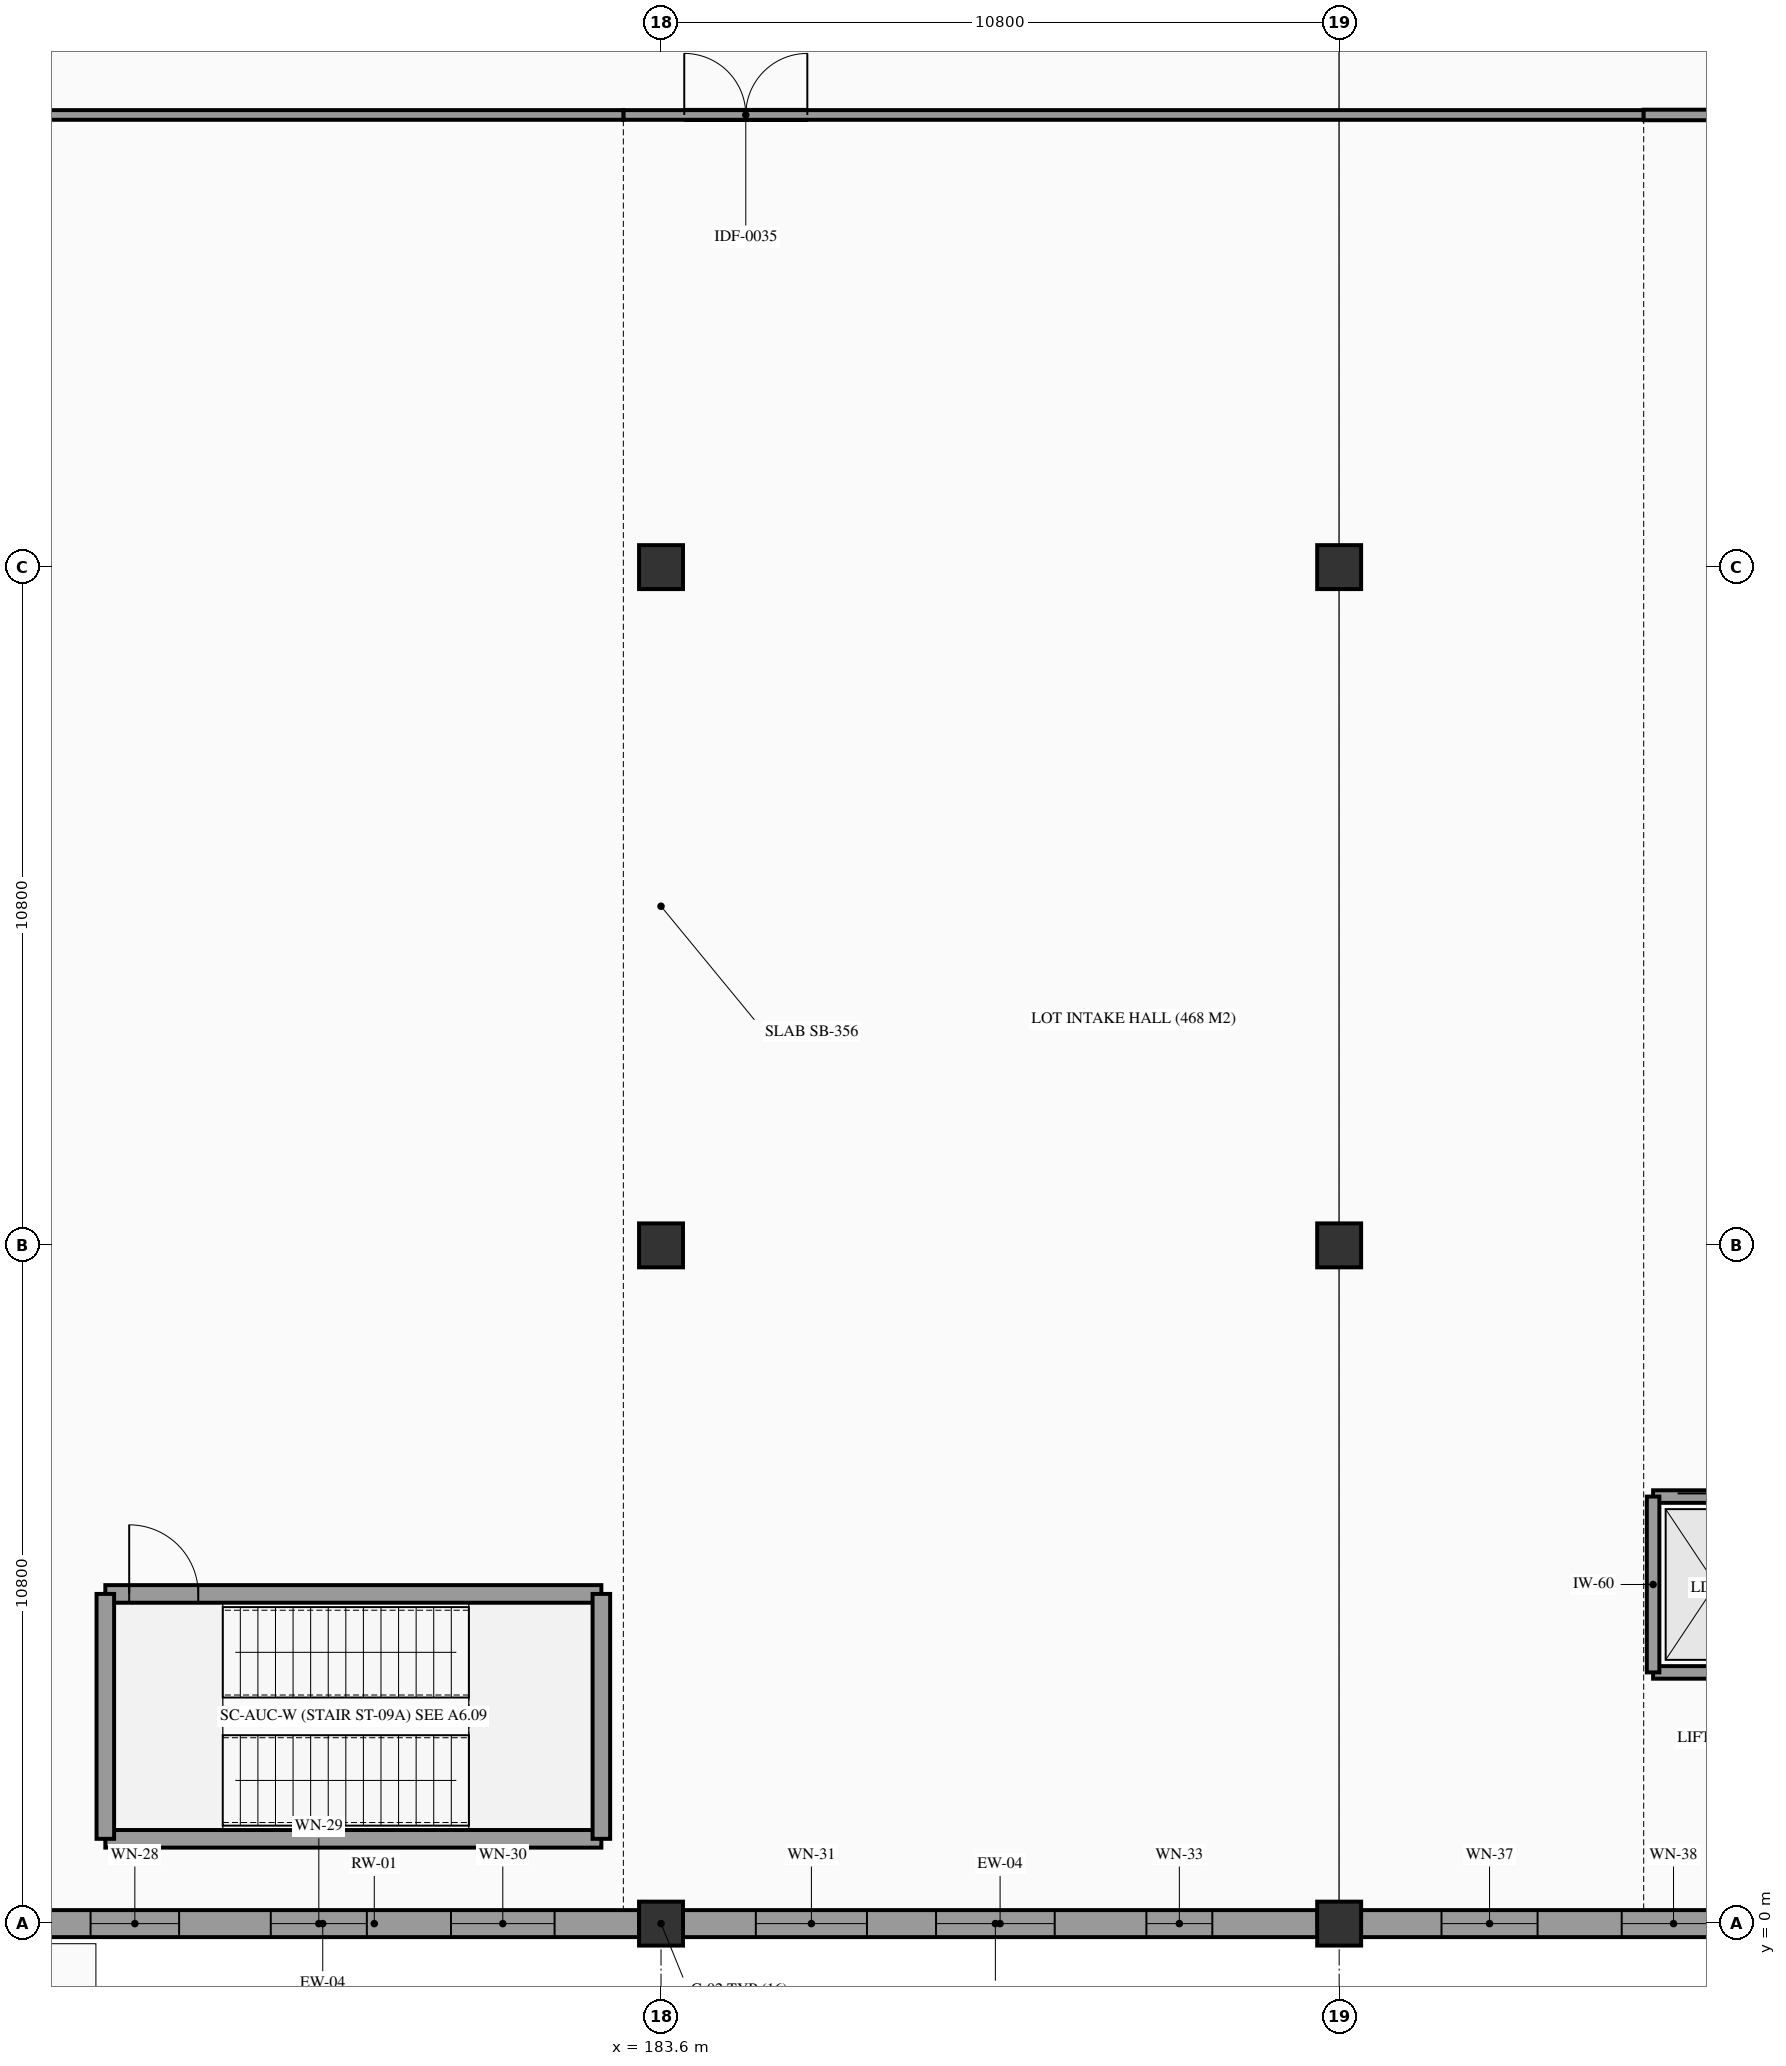
"""IFC4 building model, lengths in metres.
Left out: names, types, materials, properties, quantities, classifications, styles, units other than length and angle.
Written with IfcOpenShell. Run it as: python <this file> out.ifc"""

import sys

from ifc_helpers import new_model, si_unit, direction, frame, frame_2d, origin, origin_2d, place, context, subcontext, project, spatial, rectangle, extrude, element, fill, save


model = new_model("IFC4")
c1 = context("Model", 3, precision=1e-05, world=origin(), true_north=direction((0.0, 1.0)))
c2 = subcontext(c1, "Body", "Model", "MODEL_VIEW")
j1 = project(units=[si_unit("LENGTHUNIT", "METRE"), si_unit("PLANEANGLEUNIT", "RADIAN")], contexts=[c1])
p1 = place(None, origin())
s1 = spatial("IfcSite", under=j1, at=p1, CompositionType="ELEMENT")
p2 = place(p1, origin())
s2 = spatial("IfcBuilding", under=s1, at=p2, CompositionType="ELEMENT")
p3 = place(p2, origin())
s3 = spatial("IfcBuildingStorey", under=s2, at=p3, CompositionType="ELEMENT", Elevation=0.0)
for number, where, z_axis, x_axis in (
    (1, (183.6, 0.0, -1.2), (0.0, 0.0, 1.0), (1.0, 0.0, 0.0)),
    (2, (183.6, 10.8, -1.2), (0.0, 0.0, 1.0), (1.0, 0.0, 0.0)),
    (3, (183.6, 21.6, -1.2), (0.0, 0.0, 1.0), (1.0, 0.0, 0.0)),
    (4, (194.4, 0.0, -1.2), (0.0, 0.0, 1.0), (1.0, 0.0, 0.0)),
    (5, (194.4, 10.8, -1.2), (0.0, 0.0, 1.0), (1.0, 0.0, 0.0)),
    (6, (194.4, 21.6, -1.2), (0.0, 0.0, 1.0), (1.0, 0.0, 0.0)),
):
    element("IfcColumn", number, at=place(p3, frame(where, z_axis=z_axis, x_axis=x_axis)), inside=s3, PredefinedType="COLUMN", context=c2, shape_type="SweptSolid", body=[
        extrude(rectangle(XDim=0.7, YDim=0.7, at=origin_2d()), origin(), (0.0, 0.0, 1.0), 6.6),
    ])
p4 = place(p3, frame((108.45, 0.0, -1.2), z_axis=(0.0, 0.0, 1.0), x_axis=(1.0, 0.0, 0.0)))
e7 = element("IfcWall", 7, at=p4, inside=s3, PredefinedType="USERDEFINED", context=c2, shape_type="SweptSolid", body=[
    extrude(rectangle(XDim=107.1, YDim=0.334, at=frame_2d((53.55, 0.0))), origin(), (0.0, 0.0, 1.0), 0.14),
])
p5 = place(p3, frame((173.17, 0.0, 0.0), z_axis=(0.0, 0.0, 1.0), x_axis=(1.0, 0.0, 0.0)))
e8 = element("IfcWall", 8, at=p5, inside=s3, PredefinedType="STANDARD", context=c2, shape_type="SweptSolid", body=[
    extrude(rectangle(XDim=10.085, YDim=0.43, at=frame_2d((5.042, 0.0))), origin(), (0.0, 0.0, 1.0), 4.225),
])
p6 = place(p5, frame((1.345, 0.0, 0.95)))
e9 = element("IfcOpeningElement", 9, at=p6, cuts=e8, PredefinedType="OPENING", context=c2, shape_type="SweptSolid", body=[
    extrude(rectangle(XDim=1.41, YDim=1.35, at=frame_2d((0.705, 0.675))), frame((0.0, 0.225, 0.0), z_axis=(0.0, -1.0, 0.0), x_axis=(1.0, 0.0, 0.0)), (0.0, 0.0, 1.0), 0.45),
])
p7 = place(p5, frame((4.215, 0.0, 0.95)))
e10 = element("IfcOpeningElement", 10, at=p7, cuts=e8, PredefinedType="OPENING", context=c2, shape_type="SweptSolid", body=[
    extrude(rectangle(XDim=1.53, YDim=1.35, at=frame_2d((0.765, 0.675))), frame((0.0, 0.225, 0.0), z_axis=(0.0, -1.0, 0.0), x_axis=(1.0, 0.0, 0.0)), (0.0, 0.0, 1.0), 0.45),
])
p8 = place(p5, frame((7.085, 0.0, 0.95)))
e11 = element("IfcOpeningElement", 11, at=p8, cuts=e8, PredefinedType="OPENING", context=c2, shape_type="SweptSolid", body=[
    extrude(rectangle(XDim=1.65, YDim=1.35, at=frame_2d((0.825, 0.675))), frame((0.0, 0.225, 0.0), z_axis=(0.0, -1.0, 0.0), x_axis=(1.0, 0.0, 0.0)), (0.0, 0.0, 1.0), 0.45),
])
p9 = place(p3, frame((183.945, 0.0, 0.0), z_axis=(0.0, 0.0, 1.0), x_axis=(1.0, 0.0, 0.0)))
e12 = element("IfcWall", 12, at=p9, inside=s3, PredefinedType="STANDARD", context=c2, shape_type="SweptSolid", body=[
    extrude(rectangle(XDim=10.11, YDim=0.43, at=frame_2d((5.055, 0.0))), origin(), (0.0, 0.0, 1.0), 4.225),
])
p10 = place(p9, frame((1.165, 0.0, 0.95)))
e13 = element("IfcOpeningElement", 13, at=p10, cuts=e12, PredefinedType="OPENING", context=c2, shape_type="SweptSolid", body=[
    extrude(rectangle(XDim=1.77, YDim=1.35, at=frame_2d((0.885, 0.675))), frame((0.0, 0.225, 0.0), z_axis=(0.0, -1.0, 0.0), x_axis=(1.0, 0.0, 0.0)), (0.0, 0.0, 1.0), 0.45),
])
p11 = place(p9, frame((4.035, 0.0, 0.95)))
e14 = element("IfcOpeningElement", 14, at=p11, cuts=e12, PredefinedType="OPENING", context=c2, shape_type="SweptSolid", body=[
    extrude(rectangle(XDim=1.89, YDim=1.35, at=frame_2d((0.945, 0.675))), frame((0.0, 0.225, 0.0), z_axis=(0.0, -1.0, 0.0), x_axis=(1.0, 0.0, 0.0)), (0.0, 0.0, 1.0), 0.45),
])
p12 = place(p9, frame((7.385, 0.0, 0.95)))
e15 = element("IfcOpeningElement", 15, at=p12, cuts=e12, PredefinedType="OPENING", context=c2, shape_type="SweptSolid", body=[
    extrude(rectangle(XDim=1.05, YDim=1.5, at=frame_2d((0.525, 0.75))), frame((0.0, 0.225, 0.0), z_axis=(0.0, -1.0, 0.0), x_axis=(1.0, 0.0, 0.0)), (0.0, 0.0, 1.0), 0.45),
])
p13 = place(p3, frame((194.745, 0.0, 0.0), z_axis=(0.0, 0.0, 1.0), x_axis=(1.0, 0.0, 0.0)))
e16 = element("IfcWall", 16, at=p13, inside=s3, PredefinedType="STANDARD", context=c2, shape_type="SweptSolid", body=[
    extrude(rectangle(XDim=10.11, YDim=0.43, at=frame_2d((5.055, 0.0))), origin(), (0.0, 0.0, 1.0), 4.225),
])
p14 = place(p13, frame((1.285, 0.0, 0.95)))
e17 = element("IfcOpeningElement", 17, at=p14, cuts=e16, PredefinedType="OPENING", context=c2, shape_type="SweptSolid", body=[
    extrude(rectangle(XDim=1.53, YDim=1.5, at=frame_2d((0.765, 0.75))), frame((0.0, 0.225, 0.0), z_axis=(0.0, -1.0, 0.0), x_axis=(1.0, 0.0, 0.0)), (0.0, 0.0, 1.0), 0.45),
])
p15 = place(p13, frame((4.155, 0.0, 0.95)))
e18 = element("IfcOpeningElement", 18, at=p15, cuts=e16, PredefinedType="OPENING", context=c2, shape_type="SweptSolid", body=[
    extrude(rectangle(XDim=1.65, YDim=1.5, at=frame_2d((0.825, 0.75))), frame((0.0, 0.225, 0.0), z_axis=(0.0, -1.0, 0.0), x_axis=(1.0, 0.0, 0.0)), (0.0, 0.0, 1.0), 0.45),
])
p16 = place(p13, frame((7.025, 0.0, 0.95)))
e19 = element("IfcOpeningElement", 19, at=p16, cuts=e16, PredefinedType="OPENING", context=c2, shape_type="SweptSolid", body=[
    extrude(rectangle(XDim=1.77, YDim=1.5, at=frame_2d((0.885, 0.75))), frame((0.0, 0.225, 0.0), z_axis=(0.0, -1.0, 0.0), x_axis=(1.0, 0.0, 0.0)), (0.0, 0.0, 1.0), 0.45),
])
p17 = place(p3, frame((174.75, 1.35, 0.0), z_axis=(0.0, 0.0, 1.0), x_axis=(1.0, 0.0, 0.0)))
e20 = element("IfcWall", 20, at=p17, inside=s3, PredefinedType="SHEAR", context=c2, shape_type="SweptSolid", body=[
    extrude(rectangle(XDim=7.9, YDim=0.28, at=frame_2d((3.95, 0.0))), origin(), (0.0, 0.0, 1.0), 5.4),
])
p18 = place(p3, frame((174.75, 5.25, 0.0), z_axis=(0.0, 0.0, 1.0), x_axis=(1.0, 0.0, 0.0)))
e21 = element("IfcWall", 21, at=p18, inside=s3, PredefinedType="SHEAR", context=c2, shape_type="SweptSolid", body=[
    extrude(rectangle(XDim=7.9, YDim=0.28, at=frame_2d((3.95, 0.0))), origin(), (0.0, 0.0, 1.0), 5.4),
])
p19 = place(p18, frame((0.38, 0.0, 0.0)))
e22 = element("IfcOpeningElement", 22, at=p19, cuts=e21, PredefinedType="OPENING", context=c2, shape_type="SweptSolid", body=[
    extrude(rectangle(XDim=1.1, YDim=2.2, at=frame_2d((0.55, 1.1))), frame((0.0, 0.15, 0.0), z_axis=(0.0, -1.0, 0.0), x_axis=(1.0, 0.0, 0.0)), (0.0, 0.0, 1.0), 0.3),
])
for number, where, z_axis, x_axis in (
    (23, (174.75, 1.35, 0.0), (0.0, 0.0, 1.0), (0.0, 1.0, 0.0)),
    (24, (182.65, 1.35, 0.0), (0.0, 0.0, 1.0), (0.0, 1.0, 0.0)),
):
    element("IfcWall", number, at=place(p3, frame(where, z_axis=z_axis, x_axis=x_axis)), inside=s3, PredefinedType="SHEAR", context=c2, shape_type="SweptSolid", body=[
        extrude(rectangle(XDim=3.9, YDim=0.28, at=frame_2d((1.95, 0.0))), origin(), (0.0, 0.0, 1.0), 5.4),
    ])
p20 = place(p3, frame((199.4, 4.0, 0.0), z_axis=(0.0, 0.0, 1.0), x_axis=(1.0, 0.0, 0.0)))
e25 = element("IfcWall", 25, at=p20, inside=s3, PredefinedType="SOLIDWALL", context=c2, shape_type="SweptSolid", body=[
    extrude(rectangle(XDim=2.0, YDim=0.2, at=frame_2d((1.0, 0.0))), origin(), (0.0, 0.0, 1.0), 4.22),
])
p21 = place(p3, frame((199.4, 6.8, 0.0), z_axis=(0.0, 0.0, 1.0), x_axis=(1.0, 0.0, 0.0)))
e26 = element("IfcWall", 26, at=p21, inside=s3, PredefinedType="SOLIDWALL", context=c2, shape_type="SweptSolid", body=[
    extrude(rectangle(XDim=2.0, YDim=0.2, at=frame_2d((1.0, 0.0))), origin(), (0.0, 0.0, 1.0), 4.22),
])
p22 = place(p21, frame((0.39, 0.0, 0.0)))
e27 = element("IfcOpeningElement", 27, at=p22, cuts=e26, PredefinedType="OPENING", context=c2, shape_type="SweptSolid", body=[
    extrude(rectangle(XDim=1.22, YDim=2.2, at=frame_2d((0.61, 1.1))), frame((0.0, 0.11, 0.0), z_axis=(0.0, -1.0, 0.0), x_axis=(1.0, 0.0, 0.0)), (0.0, 0.0, 1.0), 0.22),
])
p23 = place(p3, frame((199.4, 4.0, 0.0), z_axis=(0.0, 0.0, 1.0), x_axis=(0.0, 1.0, 0.0)))
e28 = element("IfcWall", 28, at=p23, inside=s3, PredefinedType="SOLIDWALL", context=c2, shape_type="SweptSolid", body=[
    extrude(rectangle(XDim=2.8, YDim=0.2, at=frame_2d((1.4, 0.0))), origin(), (0.0, 0.0, 1.0), 4.22),
])
p24 = place(p3, frame((183.0, 28.8, 0.0), z_axis=(0.0, 0.0, 1.0), x_axis=(1.0, 0.0, 0.0)))
e29 = element("IfcWall", 29, at=p24, inside=s3, PredefinedType="PARTITIONING", context=c2, shape_type="SweptSolid", body=[
    extrude(rectangle(XDim=16.25, YDim=0.154, at=frame_2d((8.125, 0.0))), origin(), (0.0, 0.0, 1.0), 3.95),
])
p25 = place(p24, frame((0.97, 0.0, 0.0)))
e30 = element("IfcOpeningElement", 30, at=p25, cuts=e29, PredefinedType="OPENING", context=c2, shape_type="SweptSolid", body=[
    extrude(rectangle(XDim=1.96, YDim=2.3, at=frame_2d((0.98, 1.15))), frame((0.0, 0.087, 0.0), z_axis=(0.0, -1.0, 0.0), x_axis=(1.0, 0.0, 0.0)), (0.0, 0.0, 1.0), 0.174),
])
p26 = place(p3, frame((172.8, 28.8, 0.0), z_axis=(0.0, 0.0, 1.0), x_axis=(1.0, 0.0, 0.0)))
e31 = element("IfcWall", 31, at=p26, inside=s3, PredefinedType="PARTITIONING", context=c2, shape_type="SweptSolid", body=[
    extrude(rectangle(XDim=10.2, YDim=0.154, at=frame_2d((5.1, 0.0))), origin(), (0.0, 0.0, 1.0), 3.95),
])
p27 = place(p3, frame((199.25, 28.8, 0.0), z_axis=(0.0, 0.0, 1.0), x_axis=(1.0, 0.0, 0.0)))
e32 = element("IfcWall", 32, at=p27, inside=s3, PredefinedType="PARTITIONING", context=c2, shape_type="SweptSolid", body=[
    extrude(rectangle(XDim=16.75, YDim=0.168, at=frame_2d((8.375, 0.0))), origin(), (0.0, 0.0, 1.0), 3.95),
])
p28 = place(p6, frame((1.41, 0.0, 0.0), z_axis=(0.0, 0.0, 1.0), x_axis=(-1.0, 0.0, 0.0)))
e33 = element("IfcWindow", 33, at=p28, inside=s3, PartitioningType="SINGLE_PANEL", PredefinedType="WINDOW", context=c2, shape_type="SweptSolid", body=[
    extrude(rectangle(XDim=1.41, YDim=1.35, at=frame_2d((0.705, 0.675))), frame((0.0, 0.03, 0.0), z_axis=(0.0, -1.0, 0.0), x_axis=(1.0, 0.0, 0.0)), (0.0, 0.0, 1.0), 0.06),
])
fill(e9, e33)
p29 = place(p7, frame((1.53, 0.0, 0.0), z_axis=(0.0, 0.0, 1.0), x_axis=(-1.0, 0.0, 0.0)))
e34 = element("IfcWindow", 34, at=p29, inside=s3, PartitioningType="SINGLE_PANEL", PredefinedType="WINDOW", context=c2, shape_type="SweptSolid", body=[
    extrude(rectangle(XDim=1.53, YDim=1.35, at=frame_2d((0.765, 0.675))), frame((0.0, 0.03, 0.0), z_axis=(0.0, -1.0, 0.0), x_axis=(1.0, 0.0, 0.0)), (0.0, 0.0, 1.0), 0.06),
])
fill(e10, e34)
p30 = place(p8, frame((1.65, 0.0, 0.0), z_axis=(0.0, 0.0, 1.0), x_axis=(-1.0, 0.0, 0.0)))
e35 = element("IfcWindow", 35, at=p30, inside=s3, PartitioningType="SINGLE_PANEL", PredefinedType="WINDOW", context=c2, shape_type="SweptSolid", body=[
    extrude(rectangle(XDim=1.65, YDim=1.35, at=frame_2d((0.825, 0.675))), frame((0.0, 0.03, 0.0), z_axis=(0.0, -1.0, 0.0), x_axis=(1.0, 0.0, 0.0)), (0.0, 0.0, 1.0), 0.06),
])
fill(e11, e35)
p31 = place(p10, frame((1.77, 0.0, 0.0), z_axis=(0.0, 0.0, 1.0), x_axis=(-1.0, 0.0, 0.0)))
e36 = element("IfcWindow", 36, at=p31, inside=s3, PartitioningType="SINGLE_PANEL", PredefinedType="WINDOW", context=c2, shape_type="SweptSolid", body=[
    extrude(rectangle(XDim=1.77, YDim=1.35, at=frame_2d((0.885, 0.675))), frame((0.0, 0.03, 0.0), z_axis=(0.0, -1.0, 0.0), x_axis=(1.0, 0.0, 0.0)), (0.0, 0.0, 1.0), 0.06),
])
fill(e13, e36)
p32 = place(p11, frame((1.89, 0.0, 0.0), z_axis=(0.0, 0.0, 1.0), x_axis=(-1.0, 0.0, 0.0)))
e37 = element("IfcWindow", 37, at=p32, inside=s3, PartitioningType="SINGLE_PANEL", PredefinedType="WINDOW", context=c2, shape_type="SweptSolid", body=[
    extrude(rectangle(XDim=1.89, YDim=1.35, at=frame_2d((0.945, 0.675))), frame((0.0, 0.03, 0.0), z_axis=(0.0, -1.0, 0.0), x_axis=(1.0, 0.0, 0.0)), (0.0, 0.0, 1.0), 0.06),
])
fill(e14, e37)
p33 = place(p12, frame((1.05, 0.0, 0.0), z_axis=(0.0, 0.0, 1.0), x_axis=(-1.0, 0.0, 0.0)))
e38 = element("IfcWindow", 38, at=p33, inside=s3, PartitioningType="SINGLE_PANEL", PredefinedType="WINDOW", context=c2, shape_type="SweptSolid", body=[
    extrude(rectangle(XDim=1.05, YDim=1.5, at=frame_2d((0.525, 0.75))), frame((0.0, 0.03, 0.0), z_axis=(0.0, -1.0, 0.0), x_axis=(1.0, 0.0, 0.0)), (0.0, 0.0, 1.0), 0.06),
])
fill(e15, e38)
p34 = place(p14, frame((1.53, 0.0, 0.0), z_axis=(0.0, 0.0, 1.0), x_axis=(-1.0, 0.0, 0.0)))
e39 = element("IfcWindow", 39, at=p34, inside=s3, PartitioningType="SINGLE_PANEL", PredefinedType="WINDOW", context=c2, shape_type="SweptSolid", body=[
    extrude(rectangle(XDim=1.53, YDim=1.5, at=frame_2d((0.765, 0.75))), frame((0.0, 0.03, 0.0), z_axis=(0.0, -1.0, 0.0), x_axis=(1.0, 0.0, 0.0)), (0.0, 0.0, 1.0), 0.06),
])
fill(e17, e39)
p35 = place(p15, frame((1.65, 0.0, 0.0), z_axis=(0.0, 0.0, 1.0), x_axis=(-1.0, 0.0, 0.0)))
e40 = element("IfcWindow", 40, at=p35, inside=s3, PartitioningType="SINGLE_PANEL", PredefinedType="WINDOW", context=c2, shape_type="SweptSolid", body=[
    extrude(rectangle(XDim=1.65, YDim=1.5, at=frame_2d((0.825, 0.75))), frame((0.0, 0.03, 0.0), z_axis=(0.0, -1.0, 0.0), x_axis=(1.0, 0.0, 0.0)), (0.0, 0.0, 1.0), 0.06),
])
fill(e18, e40)
p36 = place(p19, frame((1.1, 0.0, 0.0), z_axis=(0.0, 0.0, 1.0), x_axis=(-1.0, 0.0, 0.0)))
e41 = element("IfcDoor", 41, at=p36, inside=s3, OperationType="SINGLE_SWING_LEFT", PredefinedType="DOOR", context=c2, shape_type="SweptSolid", body=[
    extrude(rectangle(XDim=1.1, YDim=2.2, at=frame_2d((0.55, 1.1))), frame((0.0, 0.025, 0.0), z_axis=(0.0, -1.0, 0.0), x_axis=(1.0, 0.0, 0.0)), (0.0, 0.0, 1.0), 0.05),
])
fill(e22, e41)
p37 = place(p22, origin())
e42 = element("IfcDoor", 42, at=p37, inside=s3, OperationType="DOUBLE_DOOR_SLIDING", PredefinedType="DOOR", context=c2, shape_type="SweptSolid", body=[
    extrude(rectangle(XDim=1.22, YDim=2.2, at=frame_2d((0.61, 1.1))), frame((0.0, 0.025, 0.0), z_axis=(0.0, -1.0, 0.0), x_axis=(1.0, 0.0, 0.0)), (0.0, 0.0, 1.0), 0.05),
])
fill(e27, e42)
p38 = place(p25, origin())
e43 = element("IfcDoor", 43, at=p38, inside=s3, OperationType="DOUBLE_DOOR_SINGLE_SWING", PredefinedType="DOOR", context=c2, shape_type="SweptSolid", body=[
    extrude(rectangle(XDim=1.96, YDim=2.3, at=frame_2d((0.98, 1.15))), frame((0.0, 0.025, 0.0), z_axis=(0.0, -1.0, 0.0), x_axis=(1.0, 0.0, 0.0)), (0.0, 0.0, 1.0), 0.05),
])
fill(e30, e43)
save(model, sys.argv[1])
